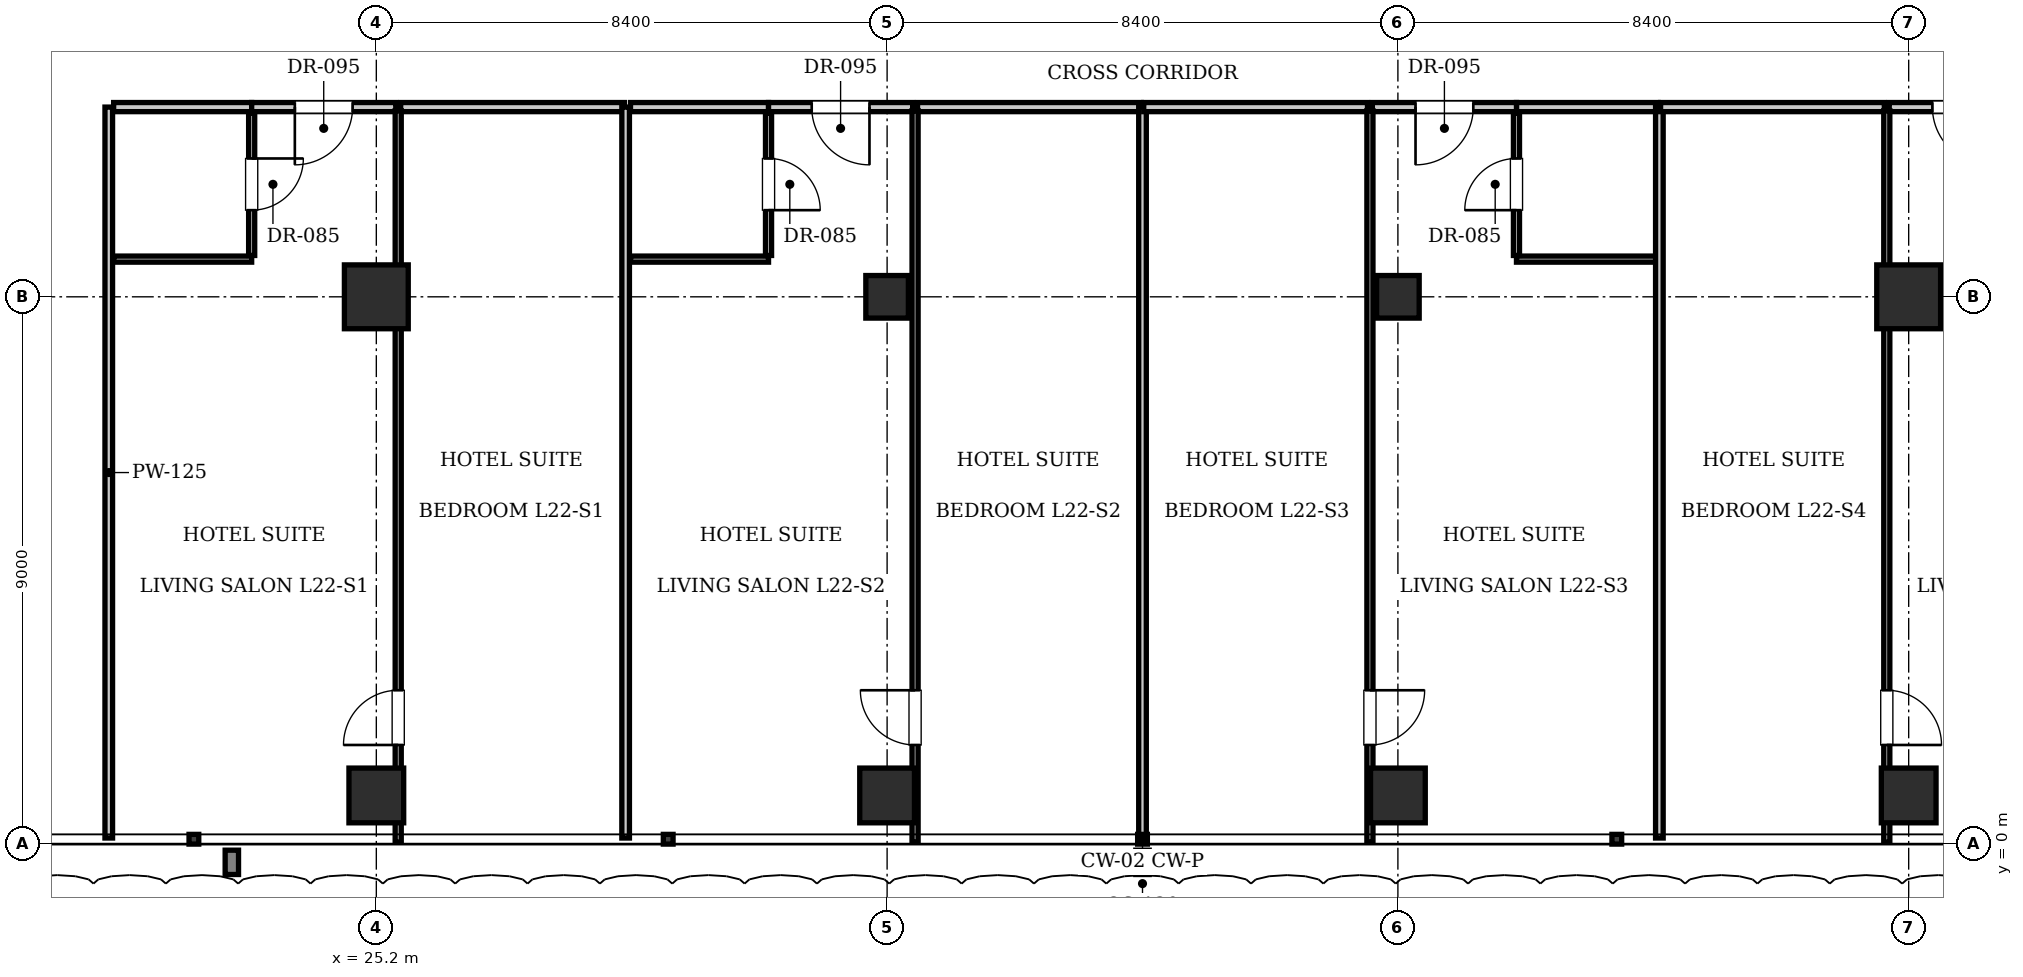
"""IFC4 building model, lengths in metres.
Left out: names, types, materials, properties, quantities, classifications, styles, units other than length and angle.
Written with IfcOpenShell. Run it as: python <this file> out.ifc"""

import sys

from ifc_helpers import new_model, si_unit, direction, frame, frame_2d, origin, origin_2d, place, context, subcontext, project, spatial, rectangle, i_section, extrude, element, fill, save


model = new_model("IFC4")
c1 = context("Model", 3, precision=1e-05, world=origin(), true_north=direction((0.0, 1.0)))
c2 = subcontext(c1, "Body", "Model", "MODEL_VIEW")
j1 = project(units=[si_unit("LENGTHUNIT", "METRE"), si_unit("PLANEANGLEUNIT", "RADIAN")], contexts=[c1])
p1 = place(None, origin())
s1 = spatial("IfcSite", under=j1, at=p1, CompositionType="ELEMENT")
p2 = place(p1, origin())
s2 = spatial("IfcBuilding", under=s1, at=p2, CompositionType="ELEMENT")
p3 = place(p2, frame((0.0, 0.0, 92.4)))
s3 = spatial("IfcBuildingStorey", under=s2, at=p3, CompositionType="ELEMENT", Elevation=92.4)
for number, where, z_axis, x_axis in (
    (1, (25.2, 9.0, 0.0), (0.0, 0.0, 1.0), (1.0, 0.0, 0.0)),
    (2, (50.4, 9.0, 0.0), (0.0, 0.0, 1.0), (1.0, 0.0, 0.0)),
):
    element("IfcColumn", number, at=place(p3, frame(where, z_axis=z_axis, x_axis=x_axis)), inside=s3, PredefinedType="COLUMN", context=c2, shape_type="SweptSolid", body=[
        extrude(rectangle(XDim=1.05, YDim=1.05, at=origin_2d()), origin(), (0.0, 0.0, 1.0), 3.85),
    ])
for number, where, z_axis, x_axis in (
    (3, (33.6, 9.0, 0.0), (0.0, 0.0, 1.0), (1.0, 0.0, 0.0)),
    (4, (42.0, 9.0, 0.0), (0.0, 0.0, 1.0), (1.0, 0.0, 0.0)),
):
    element("IfcColumn", number, at=place(p3, frame(where, z_axis=z_axis, x_axis=x_axis)), inside=s3, PredefinedType="COLUMN", context=c2, shape_type="SweptSolid", body=[
        extrude(i_section(OverallWidth=0.7, OverallDepth=0.7, WebThickness=0.028, FlangeThickness=0.044, at=origin_2d()), origin(), (0.0, 0.0, 1.0), 3.85),
    ])
for number, where, z_axis, x_axis in (
    (5, (25.2, 0.8, 0.0), (0.0, 0.0, 1.0), (1.0, 0.0, 0.0)),
    (6, (33.6, 0.8, 0.0), (0.0, 0.0, 1.0), (1.0, 0.0, 0.0)),
    (7, (42.0, 0.8, 0.0), (0.0, 0.0, 1.0), (1.0, 0.0, 0.0)),
    (8, (50.4, 0.8, 0.0), (0.0, 0.0, 1.0), (1.0, 0.0, 0.0)),
):
    element("IfcColumn", number, at=place(p3, frame(where, z_axis=z_axis, x_axis=x_axis)), inside=s3, PredefinedType="COLUMN", context=c2, shape_type="SweptSolid", body=[
        extrude(rectangle(XDim=0.9, YDim=0.9, at=origin_2d()), origin(), (0.0, 0.0, 1.0), 3.85),
    ])
p4 = place(p3, frame((20.8, 0.1, 0.0), z_axis=(0.0, 0.0, 1.0), x_axis=(0.0, 1.0, 0.0)))
e9 = element("IfcWall", 9, at=p4, inside=s3, PredefinedType="PARTITIONING", context=c2, shape_type="SweptSolid", body=[
    extrude(rectangle(XDim=12.02, YDim=0.125, at=frame_2d((6.01, 0.0))), origin(), (0.0, 0.0, 1.0), 3.61),
])
p5 = place(p3, frame((20.88, 12.12, 0.0), z_axis=(0.0, 0.0, 1.0), x_axis=(1.0, 0.0, 0.0)))
e10 = element("IfcWall", 10, at=p5, inside=s3, PredefinedType="PARTITIONING", context=c2, shape_type="SweptSolid", body=[
    extrude(rectangle(XDim=2.27, YDim=0.15, at=frame_2d((1.135, 0.0))), origin(), (0.0, 0.0, 1.0), 3.61),
])
p6 = place(p3, frame((20.88, 9.62, 0.0), z_axis=(0.0, 0.0, 1.0), x_axis=(1.0, 0.0, 0.0)))
e11 = element("IfcWall", 11, at=p6, inside=s3, PredefinedType="PARTITIONING", context=c2, shape_type="SweptSolid", body=[
    extrude(rectangle(XDim=2.27, YDim=0.1, at=frame_2d((1.135, 0.0))), origin(), (0.0, 0.0, 1.0), 3.61),
])
p7 = place(p3, frame((23.15, 9.68, 0.0), z_axis=(0.0, 0.0, 1.0), x_axis=(0.0, 1.0, 0.0)))
e12 = element("IfcWall", 12, at=p7, inside=s3, PredefinedType="PARTITIONING", context=c2, shape_type="SweptSolid", body=[
    extrude(rectangle(XDim=2.34, YDim=0.1, at=frame_2d((1.17, 0.0))), origin(), (0.0, 0.0, 1.0), 3.61),
])
p8 = place(p7, frame((0.745, 0.0, 0.0)))
e13 = element("IfcOpeningElement", 13, at=p8, cuts=e12, PredefinedType="OPENING", context=c2, shape_type="SweptSolid", body=[
    extrude(rectangle(XDim=0.85, YDim=2.1, at=frame_2d((0.425, 1.05))), frame((0.0, 0.06, 0.0), z_axis=(0.0, -1.0, 0.0), x_axis=(1.0, 0.0, 0.0)), (0.0, 0.0, 1.0), 0.12),
])
p9 = place(p3, frame((23.15, 12.12, 0.0), z_axis=(0.0, 0.0, 1.0), x_axis=(1.0, 0.0, 0.0)))
e14 = element("IfcWall", 14, at=p9, inside=s3, PredefinedType="PARTITIONING", context=c2, shape_type="SweptSolid", body=[
    extrude(rectangle(XDim=2.37, YDim=0.15, at=frame_2d((1.185, 0.0))), origin(), (0.0, 0.0, 1.0), 3.61),
])
p10 = place(p9, frame((0.71, 0.0, 0.0)))
e15 = element("IfcOpeningElement", 15, at=p10, cuts=e14, PredefinedType="OPENING", context=c2, shape_type="SweptSolid", body=[
    extrude(rectangle(XDim=0.95, YDim=2.15, at=frame_2d((0.475, 1.075))), frame((0.0, 0.085, 0.0), z_axis=(0.0, -1.0, 0.0), x_axis=(1.0, 0.0, 0.0)), (0.0, 0.0, 1.0), 0.17),
])
p11 = place(p3, frame((25.6, 12.12, 0.0), z_axis=(0.0, 0.0, 1.0), x_axis=(1.0, 0.0, 0.0)))
e16 = element("IfcWall", 16, at=p11, inside=s3, PredefinedType="PARTITIONING", context=c2, shape_type="SweptSolid", body=[
    extrude(rectangle(XDim=3.68, YDim=0.15, at=frame_2d((1.84, 0.0))), origin(), (0.0, 0.0, 1.0), 3.61),
])
p12 = place(p3, frame((25.56, 0.03, 0.0), z_axis=(0.0, 0.0, 1.0), x_axis=(0.0, 1.0, 0.0)))
e17 = element("IfcWall", 17, at=p12, inside=s3, PredefinedType="PARTITIONING", context=c2, shape_type="SweptSolid", body=[
    extrude(rectangle(XDim=12.03, YDim=0.1, at=frame_2d((6.015, 0.0))), origin(), (0.0, 0.0, 1.0), 3.61),
])
p13 = place(p12, frame((1.6, 0.0, 0.0)))
e18 = element("IfcOpeningElement", 18, at=p13, cuts=e17, PredefinedType="OPENING", context=c2, shape_type="SweptSolid", body=[
    extrude(rectangle(XDim=0.9, YDim=2.1, at=frame_2d((0.45, 1.05))), frame((0.0, 0.06, 0.0), z_axis=(0.0, -1.0, 0.0), x_axis=(1.0, 0.0, 0.0)), (0.0, 0.0, 1.0), 0.12),
])
p14 = place(p3, frame((29.3, 0.1, 0.0), z_axis=(0.0, 0.0, 1.0), x_axis=(0.0, 1.0, 0.0)))
e19 = element("IfcWall", 19, at=p14, inside=s3, PredefinedType="PARTITIONING", context=c2, shape_type="SweptSolid", body=[
    extrude(rectangle(XDim=12.02, YDim=0.125, at=frame_2d((6.01, 0.0))), origin(), (0.0, 0.0, 1.0), 3.293),
])
p15 = place(p3, frame((29.38, 12.12, 0.0), z_axis=(0.0, 0.0, 1.0), x_axis=(1.0, 0.0, 0.0)))
e20 = element("IfcWall", 20, at=p15, inside=s3, PredefinedType="PARTITIONING", context=c2, shape_type="SweptSolid", body=[
    extrude(rectangle(XDim=2.27, YDim=0.15, at=frame_2d((1.135, 0.0))), origin(), (0.0, 0.0, 1.0), 3.61),
])
p16 = place(p3, frame((29.38, 9.62, 0.0), z_axis=(0.0, 0.0, 1.0), x_axis=(1.0, 0.0, 0.0)))
e21 = element("IfcWall", 21, at=p16, inside=s3, PredefinedType="PARTITIONING", context=c2, shape_type="SweptSolid", body=[
    extrude(rectangle(XDim=2.27, YDim=0.1, at=frame_2d((1.135, 0.0))), origin(), (0.0, 0.0, 1.0), 3.61),
])
p17 = place(p3, frame((31.65, 9.68, 0.0), z_axis=(0.0, 0.0, 1.0), x_axis=(0.0, 1.0, 0.0)))
e22 = element("IfcWall", 22, at=p17, inside=s3, PredefinedType="PARTITIONING", context=c2, shape_type="SweptSolid", body=[
    extrude(rectangle(XDim=2.34, YDim=0.1, at=frame_2d((1.17, 0.0))), origin(), (0.0, 0.0, 1.0), 3.61),
])
p18 = place(p17, frame((0.745, 0.0, 0.0)))
e23 = element("IfcOpeningElement", 23, at=p18, cuts=e22, PredefinedType="OPENING", context=c2, shape_type="SweptSolid", body=[
    extrude(rectangle(XDim=0.85, YDim=2.1, at=frame_2d((0.425, 1.05))), frame((0.0, 0.06, 0.0), z_axis=(0.0, -1.0, 0.0), x_axis=(1.0, 0.0, 0.0)), (0.0, 0.0, 1.0), 0.12),
])
p19 = place(p3, frame((31.65, 12.12, 0.0), z_axis=(0.0, 0.0, 1.0), x_axis=(1.0, 0.0, 0.0)))
e24 = element("IfcWall", 24, at=p19, inside=s3, PredefinedType="PARTITIONING", context=c2, shape_type="SweptSolid", body=[
    extrude(rectangle(XDim=2.37, YDim=0.15, at=frame_2d((1.185, 0.0))), origin(), (0.0, 0.0, 1.0), 3.61),
])
p20 = place(p19, frame((0.71, 0.0, 0.0)))
e25 = element("IfcOpeningElement", 25, at=p20, cuts=e24, PredefinedType="OPENING", context=c2, shape_type="SweptSolid", body=[
    extrude(rectangle(XDim=0.95, YDim=2.15, at=frame_2d((0.475, 1.075))), frame((0.0, 0.085, 0.0), z_axis=(0.0, -1.0, 0.0), x_axis=(1.0, 0.0, 0.0)), (0.0, 0.0, 1.0), 0.17),
])
p21 = place(p3, frame((34.1, 12.12, 0.0), z_axis=(0.0, 0.0, 1.0), x_axis=(1.0, 0.0, 0.0)))
e26 = element("IfcWall", 26, at=p21, inside=s3, PredefinedType="PARTITIONING", context=c2, shape_type="SweptSolid", body=[
    extrude(rectangle(XDim=3.68, YDim=0.15, at=frame_2d((1.84, 0.0))), origin(), (0.0, 0.0, 1.0), 3.61),
])
p22 = place(p3, frame((34.06, 0.03, 0.0), z_axis=(0.0, 0.0, 1.0), x_axis=(0.0, 1.0, 0.0)))
e27 = element("IfcWall", 27, at=p22, inside=s3, PredefinedType="PARTITIONING", context=c2, shape_type="SweptSolid", body=[
    extrude(rectangle(XDim=12.03, YDim=0.1, at=frame_2d((6.015, 0.0))), origin(), (0.0, 0.0, 1.0), 3.61),
])
p23 = place(p22, frame((1.6, 0.0, 0.0)))
e28 = element("IfcOpeningElement", 28, at=p23, cuts=e27, PredefinedType="OPENING", context=c2, shape_type="SweptSolid", body=[
    extrude(rectangle(XDim=0.9, YDim=2.1, at=frame_2d((0.45, 1.05))), frame((0.0, 0.06, 0.0), z_axis=(0.0, -1.0, 0.0), x_axis=(1.0, 0.0, 0.0)), (0.0, 0.0, 1.0), 0.12),
])
p24 = place(p3, frame((37.8, 0.1, 0.0), z_axis=(0.0, 0.0, 1.0), x_axis=(0.0, 1.0, 0.0)))
e29 = element("IfcWall", 29, at=p24, inside=s3, PredefinedType="PARTITIONING", context=c2, shape_type="SweptSolid", body=[
    extrude(rectangle(XDim=12.02, YDim=0.125, at=frame_2d((6.01, 0.0))), origin(), (0.0, 0.0, 1.0), 3.3),
])
p25 = place(p3, frame((43.95, 12.12, 0.0), z_axis=(0.0, 0.0, 1.0), x_axis=(1.0, 0.0, 0.0)))
e30 = element("IfcWall", 30, at=p25, inside=s3, PredefinedType="PARTITIONING", context=c2, shape_type="SweptSolid", body=[
    extrude(rectangle(XDim=2.33, YDim=0.15, at=frame_2d((1.165, 0.0))), origin(), (0.0, 0.0, 1.0), 3.61),
])
p26 = place(p3, frame((43.95, 9.62, 0.0), z_axis=(0.0, 0.0, 1.0), x_axis=(1.0, 0.0, 0.0)))
e31 = element("IfcWall", 31, at=p26, inside=s3, PredefinedType="PARTITIONING", context=c2, shape_type="SweptSolid", body=[
    extrude(rectangle(XDim=2.31, YDim=0.1, at=frame_2d((1.155, 0.0))), origin(), (0.0, 0.0, 1.0), 3.61),
])
p27 = place(p3, frame((43.95, 9.68, 0.0), z_axis=(0.0, 0.0, 1.0), x_axis=(0.0, 1.0, 0.0)))
e32 = element("IfcWall", 32, at=p27, inside=s3, PredefinedType="PARTITIONING", context=c2, shape_type="SweptSolid", body=[
    extrude(rectangle(XDim=2.34, YDim=0.1, at=frame_2d((1.17, 0.0))), origin(), (0.0, 0.0, 1.0), 3.61),
])
p28 = place(p27, frame((0.745, 0.0, 0.0)))
e33 = element("IfcOpeningElement", 33, at=p28, cuts=e32, PredefinedType="OPENING", context=c2, shape_type="SweptSolid", body=[
    extrude(rectangle(XDim=0.85, YDim=2.1, at=frame_2d((0.425, 1.05))), frame((0.0, 0.06, 0.0), z_axis=(0.0, -1.0, 0.0), x_axis=(1.0, 0.0, 0.0)), (0.0, 0.0, 1.0), 0.12),
])
p29 = place(p3, frame((37.82, 12.12, 0.0), z_axis=(0.0, 0.0, 1.0), x_axis=(1.0, 0.0, 0.0)))
e34 = element("IfcWall", 34, at=p29, inside=s3, PredefinedType="PARTITIONING", context=c2, shape_type="SweptSolid", body=[
    extrude(rectangle(XDim=3.68, YDim=0.15, at=frame_2d((1.84, 0.0))), origin(), (0.0, 0.0, 1.0), 3.61),
])
p30 = place(p3, frame((41.58, 12.12, 0.0), z_axis=(0.0, 0.0, 1.0), x_axis=(1.0, 0.0, 0.0)))
e35 = element("IfcWall", 35, at=p30, inside=s3, PredefinedType="PARTITIONING", context=c2, shape_type="SweptSolid", body=[
    extrude(rectangle(XDim=2.37, YDim=0.15, at=frame_2d((1.185, 0.0))), origin(), (0.0, 0.0, 1.0), 3.61),
])
p31 = place(p30, frame((0.71, 0.0, 0.0)))
e36 = element("IfcOpeningElement", 36, at=p31, cuts=e35, PredefinedType="OPENING", context=c2, shape_type="SweptSolid", body=[
    extrude(rectangle(XDim=0.95, YDim=2.15, at=frame_2d((0.475, 1.075))), frame((0.0, 0.085, 0.0), z_axis=(0.0, -1.0, 0.0), x_axis=(1.0, 0.0, 0.0)), (0.0, 0.0, 1.0), 0.17),
])
p32 = place(p3, frame((41.54, 0.03, 0.0), z_axis=(0.0, 0.0, 1.0), x_axis=(0.0, 1.0, 0.0)))
e37 = element("IfcWall", 37, at=p32, inside=s3, PredefinedType="PARTITIONING", context=c2, shape_type="SweptSolid", body=[
    extrude(rectangle(XDim=12.03, YDim=0.1, at=frame_2d((6.015, 0.0))), origin(), (0.0, 0.0, 1.0), 3.61),
])
p33 = place(p32, frame((1.6, 0.0, 0.0)))
e38 = element("IfcOpeningElement", 38, at=p33, cuts=e37, PredefinedType="OPENING", context=c2, shape_type="SweptSolid", body=[
    extrude(rectangle(XDim=0.9, YDim=2.1, at=frame_2d((0.45, 1.05))), frame((0.0, 0.06, 0.0), z_axis=(0.0, -1.0, 0.0), x_axis=(1.0, 0.0, 0.0)), (0.0, 0.0, 1.0), 0.12),
])
p34 = place(p3, frame((46.3, 0.1, 0.0), z_axis=(0.0, 0.0, 1.0), x_axis=(0.0, 1.0, 0.0)))
e39 = element("IfcWall", 39, at=p34, inside=s3, PredefinedType="PARTITIONING", context=c2, shape_type="SweptSolid", body=[
    extrude(rectangle(XDim=12.02, YDim=0.125, at=frame_2d((6.01, 0.0))), origin(), (0.0, 0.0, 1.0), 3.352),
])
p35 = place(p3, frame((46.32, 12.12, 0.0), z_axis=(0.0, 0.0, 1.0), x_axis=(1.0, 0.0, 0.0)))
e40 = element("IfcWall", 40, at=p35, inside=s3, PredefinedType="PARTITIONING", context=c2, shape_type="SweptSolid", body=[
    extrude(rectangle(XDim=3.68, YDim=0.15, at=frame_2d((1.84, 0.0))), origin(), (0.0, 0.0, 1.0), 3.61),
])
p36 = place(p3, frame((50.08, 12.12, 0.0), z_axis=(0.0, 0.0, 1.0), x_axis=(1.0, 0.0, 0.0)))
e41 = element("IfcWall", 41, at=p36, inside=s3, PredefinedType="PARTITIONING", context=c2, shape_type="SweptSolid", body=[
    extrude(rectangle(XDim=2.37, YDim=0.15, at=frame_2d((1.185, 0.0))), origin(), (0.0, 0.0, 1.0), 3.61),
])
p37 = place(p36, frame((0.71, 0.0, 0.0)))
e42 = element("IfcOpeningElement", 42, at=p37, cuts=e41, PredefinedType="OPENING", context=c2, shape_type="SweptSolid", body=[
    extrude(rectangle(XDim=0.95, YDim=2.15, at=frame_2d((0.475, 1.075))), frame((0.0, 0.085, 0.0), z_axis=(0.0, -1.0, 0.0), x_axis=(1.0, 0.0, 0.0)), (0.0, 0.0, 1.0), 0.17),
])
p38 = place(p3, frame((50.04, 0.03, 0.0), z_axis=(0.0, 0.0, 1.0), x_axis=(0.0, 1.0, 0.0)))
e43 = element("IfcWall", 43, at=p38, inside=s3, PredefinedType="PARTITIONING", context=c2, shape_type="SweptSolid", body=[
    extrude(rectangle(XDim=12.03, YDim=0.1, at=frame_2d((6.015, 0.0))), origin(), (0.0, 0.0, 1.0), 3.61),
])
p39 = place(p38, frame((1.6, 0.0, 0.0)))
e44 = element("IfcOpeningElement", 44, at=p39, cuts=e43, PredefinedType="OPENING", context=c2, shape_type="SweptSolid", body=[
    extrude(rectangle(XDim=0.9, YDim=2.1, at=frame_2d((0.45, 1.05))), frame((0.0, 0.06, 0.0), z_axis=(0.0, -1.0, 0.0), x_axis=(1.0, 0.0, 0.0)), (0.0, 0.0, 1.0), 0.12),
])
p40 = place(p8, frame((0.85, 0.0, 0.0), z_axis=(0.0, 0.0, 1.0), x_axis=(-1.0, 0.0, 0.0)))
e45 = element("IfcDoor", 45, at=p40, inside=s3, OperationType="SINGLE_SWING_LEFT", PredefinedType="DOOR", context=c2, shape_type="SweptSolid", body=[
    extrude(rectangle(XDim=0.85, YDim=2.1, at=frame_2d((0.425, 1.05))), frame((0.0, 0.025, 0.0), z_axis=(0.0, -1.0, 0.0), x_axis=(1.0, 0.0, 0.0)), (0.0, 0.0, 1.0), 0.05),
])
fill(e13, e45)
p41 = place(p10, frame((0.95, 0.0, 0.0), z_axis=(0.0, 0.0, 1.0), x_axis=(-1.0, 0.0, 0.0)))
e46 = element("IfcDoor", 46, at=p41, inside=s3, OperationType="SINGLE_SWING_RIGHT", PredefinedType="DOOR", context=c2, shape_type="SweptSolid", body=[
    extrude(rectangle(XDim=0.95, YDim=2.15, at=frame_2d((0.475, 1.075))), frame((0.0, 0.025, 0.0), z_axis=(0.0, -1.0, 0.0), x_axis=(1.0, 0.0, 0.0)), (0.0, 0.0, 1.0), 0.05),
])
fill(e15, e46)
p42 = place(p13, origin())
e47 = element("IfcDoor", 47, at=p42, inside=s3, OperationType="SINGLE_SWING_LEFT", PredefinedType="DOOR", context=c2, shape_type="SweptSolid", body=[
    extrude(rectangle(XDim=0.9, YDim=2.1, at=frame_2d((0.45, 1.05))), frame((0.0, 0.025, 0.0), z_axis=(0.0, -1.0, 0.0), x_axis=(1.0, 0.0, 0.0)), (0.0, 0.0, 1.0), 0.05),
])
fill(e18, e47)
p43 = place(p18, frame((0.85, 0.0, 0.0), z_axis=(0.0, 0.0, 1.0), x_axis=(-1.0, 0.0, 0.0)))
e48 = element("IfcDoor", 48, at=p43, inside=s3, OperationType="SINGLE_SWING_RIGHT", PredefinedType="DOOR", context=c2, shape_type="SweptSolid", body=[
    extrude(rectangle(XDim=0.85, YDim=2.1, at=frame_2d((0.425, 1.05))), frame((0.0, 0.025, 0.0), z_axis=(0.0, -1.0, 0.0), x_axis=(1.0, 0.0, 0.0)), (0.0, 0.0, 1.0), 0.05),
])
fill(e23, e48)
p44 = place(p20, frame((0.95, 0.0, 0.0), z_axis=(0.0, 0.0, 1.0), x_axis=(-1.0, 0.0, 0.0)))
e49 = element("IfcDoor", 49, at=p44, inside=s3, OperationType="SINGLE_SWING_LEFT", PredefinedType="DOOR", context=c2, shape_type="SweptSolid", body=[
    extrude(rectangle(XDim=0.95, YDim=2.15, at=frame_2d((0.475, 1.075))), frame((0.0, 0.025, 0.0), z_axis=(0.0, -1.0, 0.0), x_axis=(1.0, 0.0, 0.0)), (0.0, 0.0, 1.0), 0.05),
])
fill(e25, e49)
p45 = place(p23, origin())
e50 = element("IfcDoor", 50, at=p45, inside=s3, OperationType="SINGLE_SWING_RIGHT", PredefinedType="DOOR", context=c2, shape_type="SweptSolid", body=[
    extrude(rectangle(XDim=0.9, YDim=2.1, at=frame_2d((0.45, 1.05))), frame((0.0, 0.025, 0.0), z_axis=(0.0, -1.0, 0.0), x_axis=(1.0, 0.0, 0.0)), (0.0, 0.0, 1.0), 0.05),
])
fill(e28, e50)
p46 = place(p28, origin())
e51 = element("IfcDoor", 51, at=p46, inside=s3, OperationType="SINGLE_SWING_LEFT", PredefinedType="DOOR", context=c2, shape_type="SweptSolid", body=[
    extrude(rectangle(XDim=0.85, YDim=2.1, at=frame_2d((0.425, 1.05))), frame((0.0, 0.025, 0.0), z_axis=(0.0, -1.0, 0.0), x_axis=(1.0, 0.0, 0.0)), (0.0, 0.0, 1.0), 0.05),
])
fill(e33, e51)
p47 = place(p31, frame((0.95, 0.0, 0.0), z_axis=(0.0, 0.0, 1.0), x_axis=(-1.0, 0.0, 0.0)))
e52 = element("IfcDoor", 52, at=p47, inside=s3, OperationType="SINGLE_SWING_RIGHT", PredefinedType="DOOR", context=c2, shape_type="SweptSolid", body=[
    extrude(rectangle(XDim=0.95, YDim=2.15, at=frame_2d((0.475, 1.075))), frame((0.0, 0.025, 0.0), z_axis=(0.0, -1.0, 0.0), x_axis=(1.0, 0.0, 0.0)), (0.0, 0.0, 1.0), 0.05),
])
fill(e36, e52)
p48 = place(p33, frame((0.9, 0.0, 0.0), z_axis=(0.0, 0.0, 1.0), x_axis=(-1.0, 0.0, 0.0)))
e53 = element("IfcDoor", 53, at=p48, inside=s3, OperationType="SINGLE_SWING_LEFT", PredefinedType="DOOR", context=c2, shape_type="SweptSolid", body=[
    extrude(rectangle(XDim=0.9, YDim=2.1, at=frame_2d((0.45, 1.05))), frame((0.0, 0.025, 0.0), z_axis=(0.0, -1.0, 0.0), x_axis=(1.0, 0.0, 0.0)), (0.0, 0.0, 1.0), 0.05),
])
fill(e38, e53)
p49 = place(p37, frame((0.95, 0.0, 0.0), z_axis=(0.0, 0.0, 1.0), x_axis=(-1.0, 0.0, 0.0)))
e54 = element("IfcDoor", 54, at=p49, inside=s3, OperationType="SINGLE_SWING_LEFT", PredefinedType="DOOR", context=c2, shape_type="SweptSolid", body=[
    extrude(rectangle(XDim=0.95, YDim=2.15, at=frame_2d((0.475, 1.075))), frame((0.0, 0.025, 0.0), z_axis=(0.0, -1.0, 0.0), x_axis=(1.0, 0.0, 0.0)), (0.0, 0.0, 1.0), 0.05),
])
fill(e42, e54)
p50 = place(p39, frame((0.9, 0.0, 0.0), z_axis=(0.0, 0.0, 1.0), x_axis=(-1.0, 0.0, 0.0)))
e55 = element("IfcDoor", 55, at=p50, inside=s3, OperationType="SINGLE_SWING_RIGHT", PredefinedType="DOOR", context=c2, shape_type="SweptSolid", body=[
    extrude(rectangle(XDim=0.9, YDim=2.1, at=frame_2d((0.45, 1.05))), frame((0.0, 0.025, 0.0), z_axis=(0.0, -1.0, 0.0), x_axis=(1.0, 0.0, 0.0)), (0.0, 0.0, 1.0), 0.05),
])
fill(e44, e55)
save(model, sys.argv[1])
